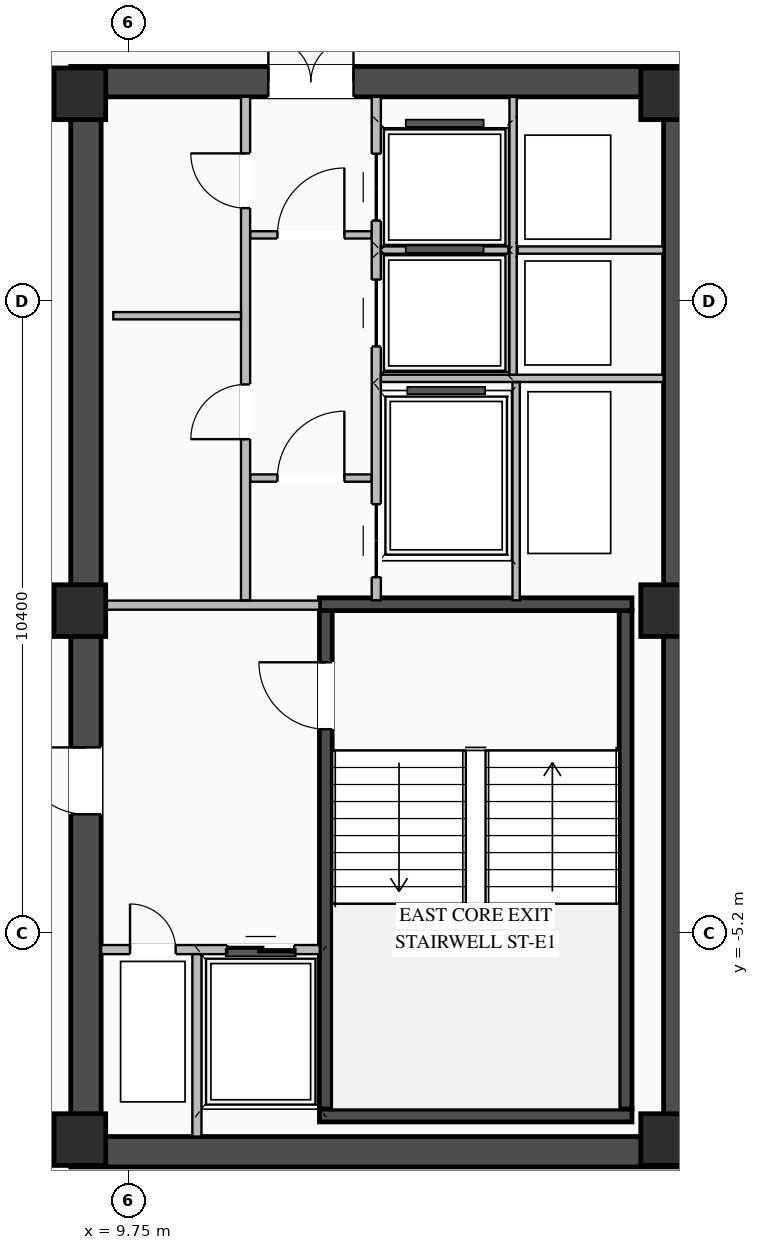
"""IFC4 building model, lengths in metres.
Left out: names, types, materials, properties, quantities, classifications, styles, units other than length and angle.
Written with IfcOpenShell. Run it as: python <this file> out.ifc"""

import sys

from ifc_helpers import new_model, si_unit, direction, frame, frame_2d, origin, origin_2d, place, context, subcontext, project, spatial, rectangle, extrude, element, fill, save


model = new_model("IFC4")
c1 = context("Model", 3, precision=1e-05, world=origin(), true_north=direction((0.0, 1.0)))
c2 = subcontext(c1, "Body", "Model", "MODEL_VIEW")
j1 = project(units=[si_unit("LENGTHUNIT", "METRE"), si_unit("PLANEANGLEUNIT", "RADIAN")], contexts=[c1])
p1 = place(None, origin())
s1 = spatial("IfcSite", under=j1, at=p1, CompositionType="ELEMENT")
p2 = place(p1, origin())
s2 = spatial("IfcBuilding", under=s1, at=p2, CompositionType="ELEMENT")
p3 = place(p2, frame((0.0, 0.0, 218.85)))
s3 = spatial("IfcBuildingStorey", under=s2, at=p3, CompositionType="ELEMENT", Elevation=218.85)
p4 = place(p3, frame((8.8, -8.8, 0.0), z_axis=(0.0, 0.0, 1.0), x_axis=(1.0, 0.0, 0.0)))
e1 = element("IfcWall", 1, at=p4, inside=s3, PredefinedType="SHEAR", context=c2, shape_type="SweptSolid", body=[
    extrude(rectangle(XDim=10.25, YDim=0.5, at=frame_2d((5.125, 0.0))), origin(), (0.0, 0.0, 1.0), 3.27),
])
p5 = place(p3, frame((8.8, 8.8, 0.0), z_axis=(0.0, 0.0, 1.0), x_axis=(1.0, 0.0, 0.0)))
e2 = element("IfcWall", 2, at=p5, inside=s3, PredefinedType="SHEAR", context=c2, shape_type="SweptSolid", body=[
    extrude(rectangle(XDim=10.25, YDim=0.5, at=frame_2d((5.125, 0.0))), origin(), (0.0, 0.0, 1.0), 3.27),
])
p6 = place(p5, frame((3.25, 0.0, 0.0)))
e3 = element("IfcOpeningElement", 3, at=p6, cuts=e2, PredefinedType="OPENING", context=c2, shape_type="SweptSolid", body=[
    extrude(rectangle(XDim=1.4, YDim=2.05, at=frame_2d((0.7, 1.025))), frame((0.0, 0.26, 0.0), z_axis=(0.0, -1.0, 0.0), x_axis=(1.0, 0.0, 0.0)), (0.0, 0.0, 1.0), 0.52),
])
p7 = place(p3, frame((9.05, -8.55, 0.0), z_axis=(0.0, 0.0, 1.0), x_axis=(0.0, 1.0, 0.0)))
e4 = element("IfcWall", 4, at=p7, inside=s3, PredefinedType="SHEAR", context=c2, shape_type="SweptSolid", body=[
    extrude(rectangle(XDim=17.1, YDim=0.5, at=frame_2d((8.55, 0.0))), origin(), (0.0, 0.0, 1.0), 3.27),
])
p8 = place(p7, frame((5.3, 0.0, 0.0)))
e5 = element("IfcOpeningElement", 5, at=p8, cuts=e4, PredefinedType="OPENING", context=c2, shape_type="SweptSolid", body=[
    extrude(rectangle(XDim=1.1, YDim=2.08, at=frame_2d((0.55, 1.04))), frame((0.0, 0.26, 0.0), z_axis=(0.0, -1.0, 0.0), x_axis=(1.0, 0.0, 0.0)), (0.0, 0.0, 1.0), 0.52),
])
p9 = place(p3, frame((18.8, -8.55, 0.0), z_axis=(0.0, 0.0, 1.0), x_axis=(0.0, 1.0, 0.0)))
e6 = element("IfcWall", 6, at=p9, inside=s3, PredefinedType="SHEAR", context=c2, shape_type="SweptSolid", body=[
    extrude(rectangle(XDim=17.1, YDim=0.5, at=frame_2d((8.55, 0.0))), origin(), (0.0, 0.0, 1.0), 3.27),
])
p10 = place(p3, frame((12.995, -8.1, 0.0), z_axis=(0.0, 0.0, 1.0), x_axis=(0.0, 1.0, 0.0)))
e7 = element("IfcWall", 7, at=p10, inside=s3, PredefinedType="SHEAR", context=c2, shape_type="SweptSolid", body=[
    extrude(rectangle(XDim=8.2, YDim=0.21, at=frame_2d((4.1, 0.0))), origin(), (0.0, 0.0, 1.0), 3.27),
])
p11 = place(p10, frame((6.25, 0.0, 0.0)))
e8 = element("IfcOpeningElement", 8, at=p11, cuts=e7, PredefinedType="OPENING", context=c2, shape_type="SweptSolid", body=[
    extrude(rectangle(XDim=1.1, YDim=2.15, at=frame_2d((0.55, 1.075))), frame((0.0, 0.115, 0.0), z_axis=(0.0, -1.0, 0.0), x_axis=(1.0, 0.0, 0.0)), (0.0, 0.0, 1.0), 0.23),
])
p12 = place(p3, frame((17.925, -8.1, 0.0), z_axis=(0.0, 0.0, 1.0), x_axis=(0.0, 1.0, 0.0)))
e9 = element("IfcWall", 9, at=p12, inside=s3, PredefinedType="SHEAR", context=c2, shape_type="SweptSolid", body=[
    extrude(rectangle(XDim=8.2, YDim=0.21, at=frame_2d((4.1, 0.0))), origin(), (0.0, 0.0, 1.0), 3.27),
])
for number, where, z_axis, x_axis in (
    (10, (12.89, -8.205, 0.0), (0.0, 0.0, 1.0), (1.0, 0.0, 0.0)),
    (11, (18.03, 0.205, 0.0), (0.0, 0.0, 1.0), (-1.0, 0.0, 0.0)),
):
    element("IfcWall", number, at=place(p3, frame(where, z_axis=z_axis, x_axis=x_axis)), inside=s3, PredefinedType="SHEAR", context=c2, shape_type="SweptSolid", body=[
        extrude(rectangle(XDim=5.14, YDim=0.21, at=frame_2d((2.57, 0.0))), origin(), (0.0, 0.0, 1.0), 3.27),
    ])
for number, where, z_axis, x_axis in (
    (12, (8.95, -8.6, 0.0), (0.0, 0.0, 1.0), (1.0, 0.0, 0.0)),
    (13, (8.95, 0.1, 0.0), (0.0, 0.0, 1.0), (1.0, 0.0, 0.0)),
    (14, (8.95, 8.6, 0.0), (0.0, 0.0, 1.0), (1.0, 0.0, 0.0)),
    (15, (18.6, -8.6, 0.0), (0.0, 0.0, 1.0), (1.0, 0.0, 0.0)),
    (16, (18.6, 0.1, 0.0), (0.0, 0.0, 1.0), (1.0, 0.0, 0.0)),
    (17, (18.6, 8.6, 0.0), (0.0, 0.0, 1.0), (1.0, 0.0, 0.0)),
):
    element("IfcColumn", number, at=place(p3, frame(where, z_axis=z_axis, x_axis=x_axis)), inside=s3, PredefinedType="COLUMN", context=c2, shape_type="SweptSolid", body=[
        extrude(rectangle(XDim=0.85, YDim=0.85, at=origin_2d()), origin(), (0.0, 0.0, 1.0), 3.45),
    ])
p13 = place(p3, frame((9.3, -5.475, 0.0), z_axis=(0.0, 0.0, 1.0), x_axis=(1.0, 0.0, 0.0)))
e18 = element("IfcWall", 18, at=p13, inside=s3, PredefinedType="STANDARD", context=c2, shape_type="SweptSolid", body=[
    extrude(rectangle(XDim=3.595, YDim=0.15, at=frame_2d((1.797, 0.0))), origin(), (0.0, 0.0, 1.0), 3.25),
])
p14 = place(p13, frame((2.075, 0.0, 0.0)))
e19 = element("IfcOpeningElement", 19, at=p14, cuts=e18, PredefinedType="OPENING", context=c2, shape_type="SweptSolid", body=[
    extrude(rectangle(XDim=1.1, YDim=2.15, at=frame_2d((0.55, 1.075))), frame((0.0, 0.085, 0.0), z_axis=(0.0, -1.0, 0.0), x_axis=(1.0, 0.0, 0.0)), (0.0, 0.0, 1.0), 0.17),
])
p15 = place(p13, frame((0.475, 0.0, 0.0)))
e20 = element("IfcOpeningElement", 20, at=p15, cuts=e18, PredefinedType="OPENING", context=c2, shape_type="SweptSolid", body=[
    extrude(rectangle(XDim=0.75, YDim=2.05, at=frame_2d((0.375, 1.025))), frame((0.0, 0.085, 0.0), z_axis=(0.0, -1.0, 0.0), x_axis=(1.0, 0.0, 0.0)), (0.0, 0.0, 1.0), 0.17),
])
p16 = place(p3, frame((10.875, -8.55, 0.0), z_axis=(0.0, 0.0, 1.0), x_axis=(0.0, 1.0, 0.0)))
e21 = element("IfcWall", 21, at=p16, inside=s3, PredefinedType="STANDARD", context=c2, shape_type="SweptSolid", body=[
    extrude(rectangle(XDim=3.0, YDim=0.15, at=frame_2d((1.5, 0.0))), origin(), (0.0, 0.0, 1.0), 3.25),
])
p17 = place(p3, frame((9.3, 0.19, 0.0), z_axis=(0.0, 0.0, 1.0), x_axis=(1.0, 0.0, 0.0)))
e22 = element("IfcWall", 22, at=p17, inside=s3, PredefinedType="STANDARD", context=c2, shape_type="SweptSolid", body=[
    extrude(rectangle(XDim=3.59, YDim=0.15, at=frame_2d((1.795, 0.0))), origin(), (0.0, 0.0, 1.0), 2.645),
])
p18 = place(p3, frame((11.75, 2.28, 0.0), z_axis=(0.0, 0.0, 1.0), x_axis=(1.0, 0.0, 0.0)))
e23 = element("IfcWall", 23, at=p18, inside=s3, PredefinedType="STANDARD", context=c2, shape_type="SweptSolid", body=[
    extrude(rectangle(XDim=2.0, YDim=0.12, at=frame_2d((1.0, 0.0))), origin(), (0.0, 0.0, 1.0), 3.25),
])
p19 = place(p18, frame((0.45, 0.0, 0.0)))
e24 = element("IfcOpeningElement", 24, at=p19, cuts=e23, PredefinedType="OPENING", context=c2, shape_type="SweptSolid", body=[
    extrude(rectangle(XDim=1.1, YDim=2.1, at=frame_2d((0.55, 1.05))), frame((0.0, 0.07, 0.0), z_axis=(0.0, -1.0, 0.0), x_axis=(1.0, 0.0, 0.0)), (0.0, 0.0, 1.0), 0.14),
])
p20 = place(p3, frame((11.75, 6.28, 0.0), z_axis=(0.0, 0.0, 1.0), x_axis=(1.0, 0.0, 0.0)))
e25 = element("IfcWall", 25, at=p20, inside=s3, PredefinedType="STANDARD", context=c2, shape_type="SweptSolid", body=[
    extrude(rectangle(XDim=2.0, YDim=0.12, at=frame_2d((1.0, 0.0))), origin(), (0.0, 0.0, 1.0), 3.25),
])
p21 = place(p20, frame((0.45, 0.0, 0.0)))
e26 = element("IfcOpeningElement", 26, at=p21, cuts=e25, PredefinedType="OPENING", context=c2, shape_type="SweptSolid", body=[
    extrude(rectangle(XDim=1.1, YDim=2.1, at=frame_2d((0.55, 1.05))), frame((0.0, 0.07, 0.0), z_axis=(0.0, -1.0, 0.0), x_axis=(1.0, 0.0, 0.0)), (0.0, 0.0, 1.0), 0.14),
])
p22 = place(p3, frame((11.675, 0.27, 0.0), z_axis=(0.0, 0.0, 1.0), x_axis=(0.0, 1.0, 0.0)))
e27 = element("IfcWall", 27, at=p22, inside=s3, PredefinedType="STANDARD", context=c2, shape_type="SweptSolid", body=[
    extrude(rectangle(XDim=8.28, YDim=0.15, at=frame_2d((4.14, 0.0))), origin(), (0.0, 0.0, 1.0), 3.25),
])
p23 = place(p22, frame((2.65, 0.0, 0.0)))
e28 = element("IfcOpeningElement", 28, at=p23, cuts=e27, PredefinedType="OPENING", context=c2, shape_type="SweptSolid", body=[
    extrude(rectangle(XDim=0.9, YDim=2.05, at=frame_2d((0.45, 1.025))), frame((0.0, 0.085, 0.0), z_axis=(0.0, -1.0, 0.0), x_axis=(1.0, 0.0, 0.0)), (0.0, 0.0, 1.0), 0.17),
])
p24 = place(p22, frame((6.45, 0.0, 0.0)))
e29 = element("IfcOpeningElement", 29, at=p24, cuts=e27, PredefinedType="OPENING", context=c2, shape_type="SweptSolid", body=[
    extrude(rectangle(XDim=0.9, YDim=2.05, at=frame_2d((0.45, 1.025))), frame((0.0, 0.085, 0.0), z_axis=(0.0, -1.0, 0.0), x_axis=(1.0, 0.0, 0.0)), (0.0, 0.0, 1.0), 0.17),
])
p25 = place(p3, frame((9.5, 4.95, 0.0), z_axis=(0.0, 0.0, 1.0), x_axis=(1.0, 0.0, 0.0)))
e30 = element("IfcWall", 30, at=p25, inside=s3, PredefinedType="STANDARD", context=c2, shape_type="SweptSolid", body=[
    extrude(rectangle(XDim=2.1, YDim=0.12, at=frame_2d((1.05, 0.0))), origin(), (0.0, 0.0, 1.0), 3.25),
])
p26 = place(p3, frame((13.825, 0.27, 0.0), z_axis=(0.0, 0.0, 1.0), x_axis=(0.0, 1.0, 0.0)))
e31 = element("IfcWall", 31, at=p26, inside=s3, PredefinedType="STANDARD", context=c2, shape_type="SweptSolid", body=[
    extrude(rectangle(XDim=8.28, YDim=0.15, at=frame_2d((4.14, 0.0))), origin(), (0.0, 0.0, 1.0), 3.25),
])
p27 = place(p26, frame((4.175, 0.0, 0.0)))
e32 = element("IfcOpeningElement", 32, at=p27, cuts=e31, PredefinedType="OPENING", context=c2, shape_type="SweptSolid", body=[
    extrude(rectangle(XDim=1.1, YDim=2.1, at=frame_2d((0.55, 1.05))), frame((0.0, 0.085, 0.0), z_axis=(0.0, -1.0, 0.0), x_axis=(1.0, 0.0, 0.0)), (0.0, 0.0, 1.0), 0.17),
])
p28 = place(p26, frame((6.245, 0.0, 0.0)))
e33 = element("IfcOpeningElement", 33, at=p28, cuts=e31, PredefinedType="OPENING", context=c2, shape_type="SweptSolid", body=[
    extrude(rectangle(XDim=1.1, YDim=2.1, at=frame_2d((0.55, 1.05))), frame((0.0, 0.085, 0.0), z_axis=(0.0, -1.0, 0.0), x_axis=(1.0, 0.0, 0.0)), (0.0, 0.0, 1.0), 0.17),
])
p29 = place(p26, frame((0.38, 0.0, 0.0)))
e34 = element("IfcOpeningElement", 34, at=p29, cuts=e31, PredefinedType="OPENING", context=c2, shape_type="SweptSolid", body=[
    extrude(rectangle(XDim=1.2, YDim=2.1, at=frame_2d((0.6, 1.05))), frame((0.0, 0.085, 0.0), z_axis=(0.0, -1.0, 0.0), x_axis=(1.0, 0.0, 0.0)), (0.0, 0.0, 1.0), 0.17),
])
p30 = place(p3, frame((13.9, 3.92, 0.0), z_axis=(0.0, 0.0, 1.0), x_axis=(1.0, 0.0, 0.0)))
e35 = element("IfcWall", 35, at=p30, inside=s3, PredefinedType="STANDARD", context=c2, shape_type="SweptSolid", body=[
    extrude(rectangle(XDim=4.65, YDim=0.12, at=frame_2d((2.325, 0.0))), origin(), (0.0, 0.0, 1.0), 3.25),
])
p31 = place(p3, frame((16.15, 6.03, 0.0), z_axis=(0.0, 0.0, 1.0), x_axis=(1.0, 0.0, 0.0)))
e36 = element("IfcWall", 36, at=p31, inside=s3, PredefinedType="STANDARD", context=c2, shape_type="SweptSolid", body=[
    extrude(rectangle(XDim=2.4, YDim=0.12, at=frame_2d((1.2, 0.0))), origin(), (0.0, 0.0, 1.0), 3.25),
])
p32 = place(p3, frame((16.075, 3.98, 0.0), z_axis=(0.0, 0.0, 1.0), x_axis=(0.0, 1.0, 0.0)))
e37 = element("IfcWall", 37, at=p32, inside=s3, PredefinedType="STANDARD", context=c2, shape_type="SweptSolid", body=[
    extrude(rectangle(XDim=4.57, YDim=0.12, at=frame_2d((2.285, 0.0))), origin(), (0.0, 0.0, 1.0), 3.25),
])
p33 = place(p3, frame((13.9, 6.03, 0.0), z_axis=(0.0, 0.0, 1.0), x_axis=(1.0, 0.0, 0.0)))
e38 = element("IfcWall", 38, at=p33, inside=s3, PredefinedType="STANDARD", context=c2, shape_type="SweptSolid", body=[
    extrude(rectangle(XDim=2.1, YDim=0.12, at=frame_2d((1.05, 0.0))), origin(), (0.0, 0.0, 1.0), 3.25),
])
p34 = place(p3, frame((16.125, 0.27, 0.0), z_axis=(0.0, 0.0, 1.0), x_axis=(0.0, 1.0, 0.0)))
e39 = element("IfcWall", 39, at=p34, inside=s3, PredefinedType="STANDARD", context=c2, shape_type="SweptSolid", body=[
    extrude(rectangle(XDim=3.59, YDim=0.12, at=frame_2d((1.795, 0.0))), origin(), (0.0, 0.0, 1.0), 3.25),
])
p35 = place(p11, origin())
e40 = element("IfcDoor", 40, at=p35, inside=s3, OperationType="SINGLE_SWING_RIGHT", PredefinedType="DOOR", context=c2, shape_type="SweptSolid", body=[
    extrude(rectangle(XDim=1.1, YDim=2.15, at=frame_2d((0.55, 1.075))), frame((0.0, 0.025, 0.0), z_axis=(0.0, -1.0, 0.0), x_axis=(1.0, 0.0, 0.0)), (0.0, 0.0, 1.0), 0.05),
])
fill(e8, e40)
p36 = place(p14, origin())
e41 = element("IfcDoor", 41, at=p36, inside=s3, OperationType="DOUBLE_DOOR_SLIDING", PredefinedType="DOOR", context=c2, shape_type="SweptSolid", body=[
    extrude(rectangle(XDim=1.1, YDim=2.15, at=frame_2d((0.55, 1.075))), frame((0.0, 0.025, 0.0), z_axis=(0.0, -1.0, 0.0), x_axis=(1.0, 0.0, 0.0)), (0.0, 0.0, 1.0), 0.05),
])
fill(e19, e41)
p37 = place(p15, origin())
e42 = element("IfcDoor", 42, at=p37, inside=s3, OperationType="SINGLE_SWING_LEFT", PredefinedType="DOOR", context=c2, shape_type="SweptSolid", body=[
    extrude(rectangle(XDim=0.75, YDim=2.05, at=frame_2d((0.375, 1.025))), frame((0.0, 0.025, 0.0), z_axis=(0.0, -1.0, 0.0), x_axis=(1.0, 0.0, 0.0)), (0.0, 0.0, 1.0), 0.05),
])
fill(e20, e42)
p38 = place(p8, origin())
e43 = element("IfcDoor", 43, at=p38, inside=s3, OperationType="SINGLE_SWING_RIGHT", PredefinedType="DOOR", context=c2, shape_type="SweptSolid", body=[
    extrude(rectangle(XDim=1.1, YDim=2.08, at=frame_2d((0.55, 1.04))), frame((0.0, -0.155, 0.0), z_axis=(0.0, -1.0, 0.0), x_axis=(1.0, 0.0, 0.0)), (0.0, 0.0, 1.0), 0.05),
])
fill(e5, e43)
p39 = place(p19, origin())
e44 = element("IfcDoor", 44, at=p39, inside=s3, OperationType="SINGLE_SWING_RIGHT", PredefinedType="DOOR", context=c2, shape_type="SweptSolid", body=[
    extrude(rectangle(XDim=1.1, YDim=2.1, at=frame_2d((0.55, 1.05))), frame((0.0, 0.025, 0.0), z_axis=(0.0, -1.0, 0.0), x_axis=(1.0, 0.0, 0.0)), (0.0, 0.0, 1.0), 0.05),
])
fill(e24, e44)
p40 = place(p21, origin())
e45 = element("IfcDoor", 45, at=p40, inside=s3, OperationType="SINGLE_SWING_RIGHT", PredefinedType="DOOR", context=c2, shape_type="SweptSolid", body=[
    extrude(rectangle(XDim=1.1, YDim=2.1, at=frame_2d((0.55, 1.05))), frame((0.0, 0.025, 0.0), z_axis=(0.0, -1.0, 0.0), x_axis=(1.0, 0.0, 0.0)), (0.0, 0.0, 1.0), 0.05),
])
fill(e26, e45)
p41 = place(p6, origin())
e46 = element("IfcDoor", 46, at=p41, inside=s3, OperationType="DOUBLE_DOOR_SINGLE_SWING", PredefinedType="DOOR", context=c2, shape_type="SweptSolid", body=[
    extrude(rectangle(XDim=1.4, YDim=2.05, at=frame_2d((0.7, 1.025))), frame((0.0, 0.195, 0.0), z_axis=(0.0, -1.0, 0.0), x_axis=(1.0, 0.0, 0.0)), (0.0, 0.0, 1.0), 0.05),
])
fill(e3, e46)
p42 = place(p23, origin())
e47 = element("IfcDoor", 47, at=p42, inside=s3, OperationType="SINGLE_SWING_LEFT", PredefinedType="DOOR", context=c2, shape_type="SweptSolid", body=[
    extrude(rectangle(XDim=0.9, YDim=2.05, at=frame_2d((0.45, 1.025))), frame((0.0, 0.025, 0.0), z_axis=(0.0, -1.0, 0.0), x_axis=(1.0, 0.0, 0.0)), (0.0, 0.0, 1.0), 0.05),
])
fill(e28, e47)
p43 = place(p24, origin())
e48 = element("IfcDoor", 48, at=p43, inside=s3, OperationType="SINGLE_SWING_RIGHT", PredefinedType="DOOR", context=c2, shape_type="SweptSolid", body=[
    extrude(rectangle(XDim=0.9, YDim=2.05, at=frame_2d((0.45, 1.025))), frame((0.0, 0.025, 0.0), z_axis=(0.0, -1.0, 0.0), x_axis=(1.0, 0.0, 0.0)), (0.0, 0.0, 1.0), 0.05),
])
fill(e29, e48)
p44 = place(p27, origin())
e49 = element("IfcDoor", 49, at=p44, inside=s3, OperationType="DOUBLE_DOOR_SLIDING", PredefinedType="DOOR", context=c2, shape_type="SweptSolid", body=[
    extrude(rectangle(XDim=1.1, YDim=2.1, at=frame_2d((0.55, 1.05))), frame((0.0, 0.025, 0.0), z_axis=(0.0, -1.0, 0.0), x_axis=(1.0, 0.0, 0.0)), (0.0, 0.0, 1.0), 0.05),
])
fill(e32, e49)
p45 = place(p28, origin())
e50 = element("IfcDoor", 50, at=p45, inside=s3, OperationType="DOUBLE_DOOR_SLIDING", PredefinedType="DOOR", context=c2, shape_type="SweptSolid", body=[
    extrude(rectangle(XDim=1.1, YDim=2.1, at=frame_2d((0.55, 1.05))), frame((0.0, 0.025, 0.0), z_axis=(0.0, -1.0, 0.0), x_axis=(1.0, 0.0, 0.0)), (0.0, 0.0, 1.0), 0.05),
])
fill(e33, e50)
p46 = place(p29, origin())
e51 = element("IfcDoor", 51, at=p46, inside=s3, OperationType="DOUBLE_DOOR_SLIDING", PredefinedType="DOOR", context=c2, shape_type="SweptSolid", body=[
    extrude(rectangle(XDim=1.2, YDim=2.1, at=frame_2d((0.6, 1.05))), frame((0.0, 0.025, 0.0), z_axis=(0.0, -1.0, 0.0), x_axis=(1.0, 0.0, 0.0)), (0.0, 0.0, 1.0), 0.05),
])
fill(e34, e51)
save(model, sys.argv[1])
